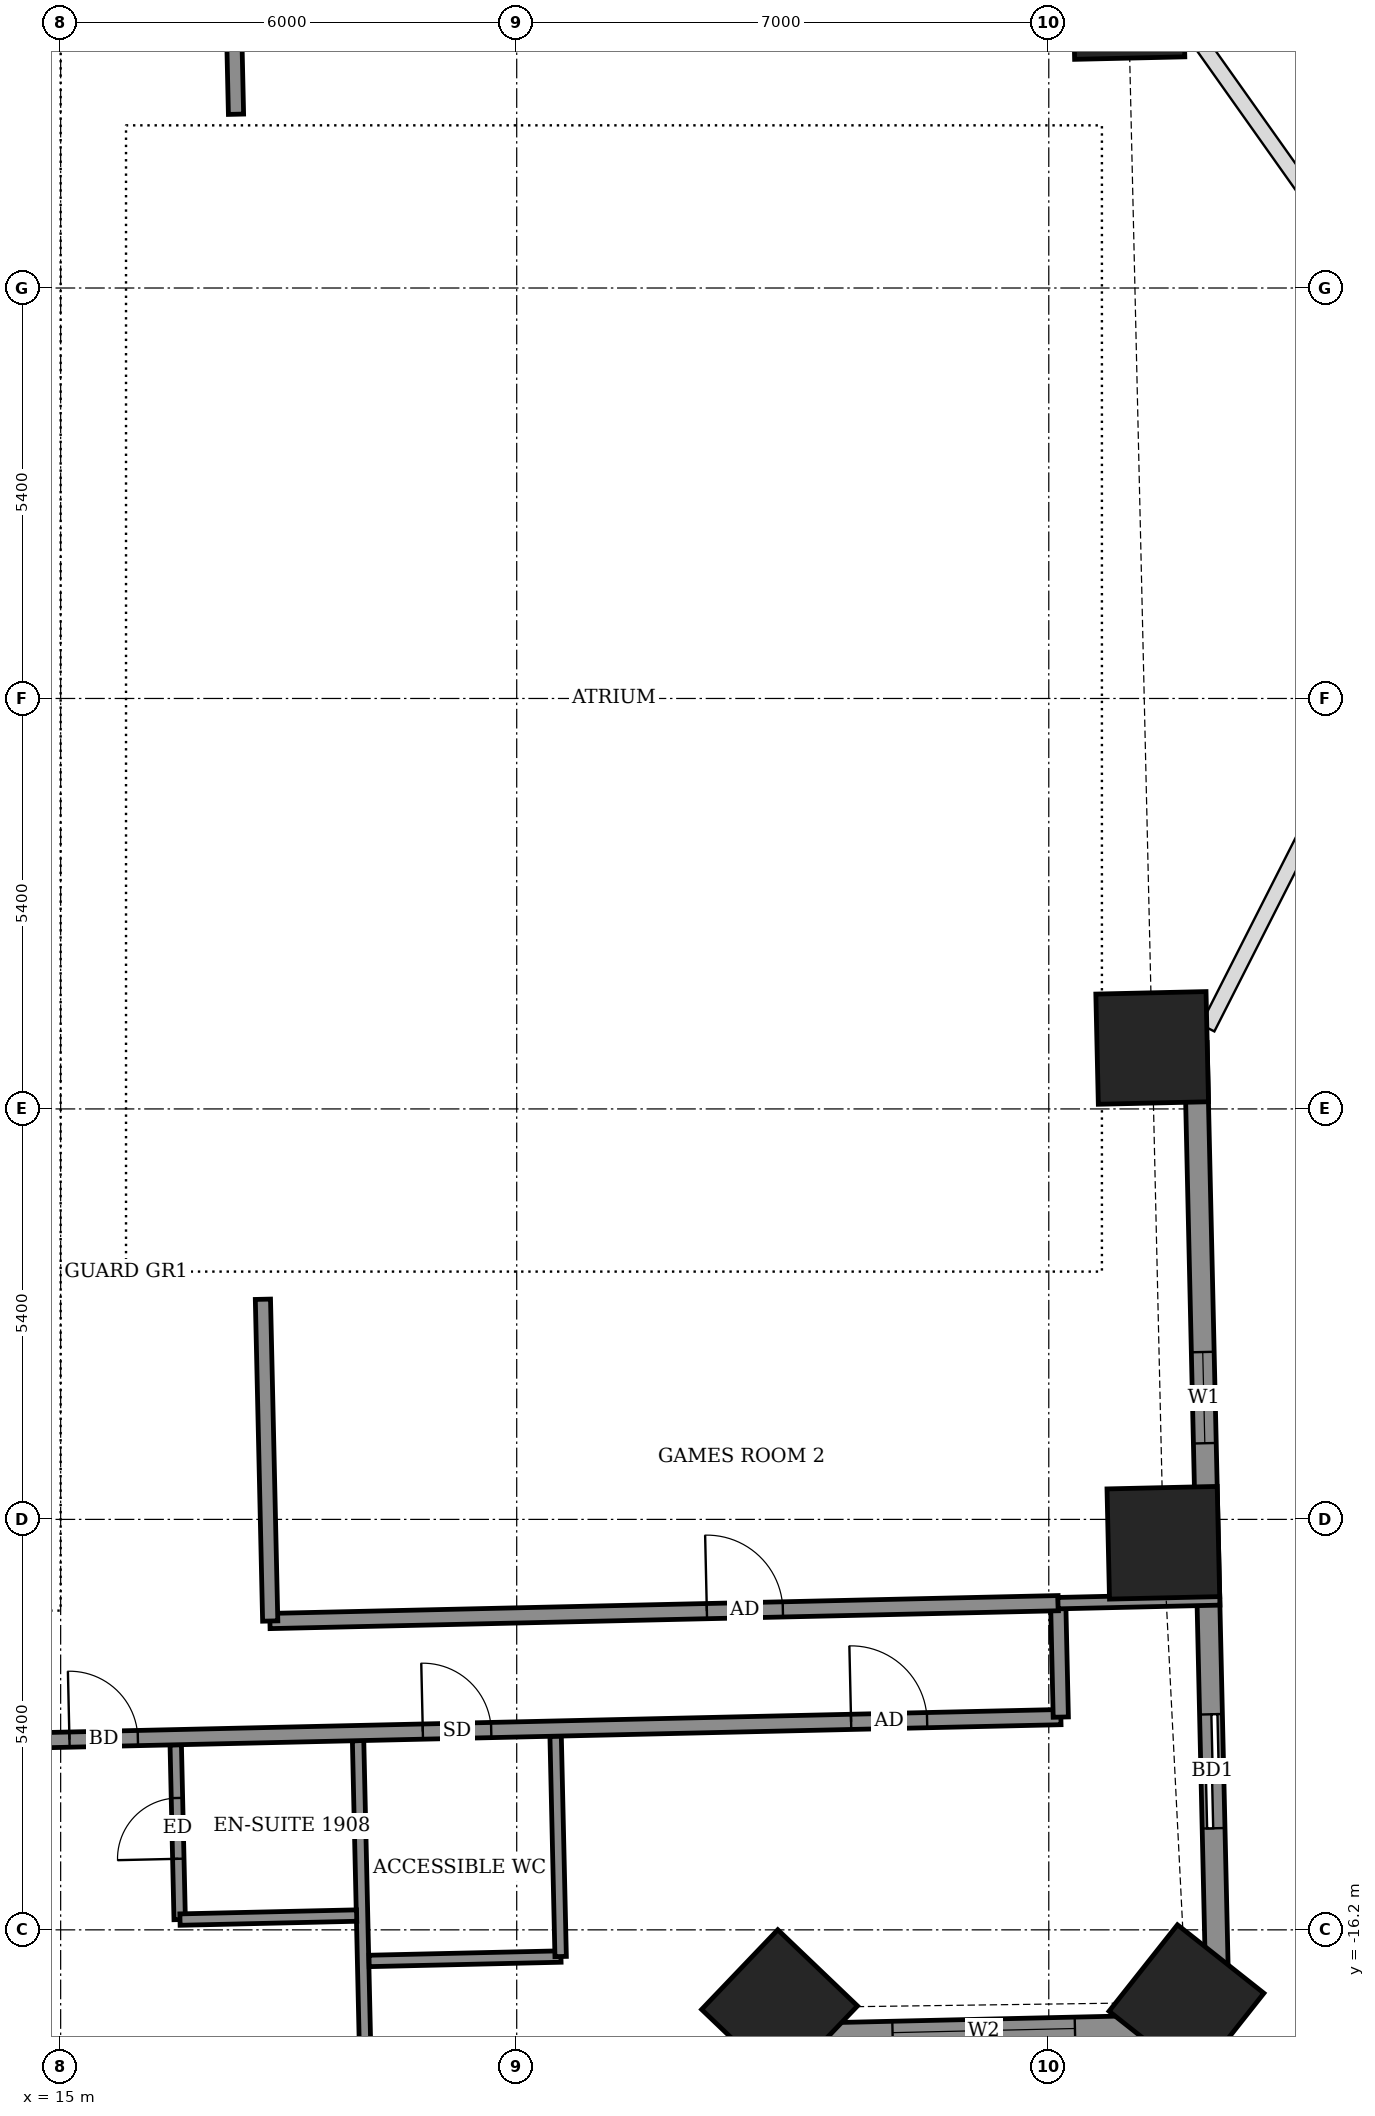
"""IFC4 building model, lengths in metres.
Left out: names, types, materials, properties, quantities, classifications, styles, units other than length and angle.
Written with IfcOpenShell. Run it as: python <this file> out.ifc"""

import sys

from ifc_helpers import new_model, si_unit, direction, frame, frame_2d, origin, origin_2d, place, context, subcontext, project, spatial, rectangle, extrude, element, fill, save


model = new_model("IFC4")
c1 = context("Model", 3, precision=1e-05, world=origin(), true_north=direction((0.0, 1.0)))
c2 = subcontext(c1, "Body", "Model", "MODEL_VIEW")
j1 = project(units=[si_unit("LENGTHUNIT", "METRE"), si_unit("PLANEANGLEUNIT", "RADIAN")], contexts=[c1])
p1 = place(None, origin())
s1 = spatial("IfcSite", under=j1, at=p1, CompositionType="ELEMENT")
p2 = place(p1, origin())
s2 = spatial("IfcBuilding", under=s1, at=p2, CompositionType="ELEMENT")
p3 = place(p2, frame((0.0, 0.0, 79.3)))
s3 = spatial("IfcBuildingStorey", under=s2, at=p3, CompositionType="ELEMENT", Elevation=79.3)
for number, where, z_axis, x_axis in (
    (1, (24.458, -17.224, -0.55), (0.0, 0.0, 1.0), (0.691, 0.723, 0.0)),
    (2, (29.812, -17.152, -0.55), (0.0, 0.0, 1.0), (0.621, 0.784, 0.0)),
    (3, (29.507, -11.107, -0.55), (0.0, 0.0, 1.0), (-0.023, 1.0, 0.0)),
    (4, (29.36, -4.597, -0.55), (0.0, 0.0, 1.0), (-0.023, 1.0, 0.0)),
    (5, (29.048, 9.15, -0.55), (0.0, 0.0, 1.0), (-0.023, 1.0, 0.0)),
):
    element("IfcColumn", number, at=place(p3, frame(where, z_axis=z_axis, x_axis=x_axis)), inside=s3, PredefinedType="COLUMN", context=c2, shape_type="SweptSolid", body=[
        extrude(rectangle(XDim=1.45, YDim=1.45, at=origin_2d()), origin(), (0.0, 0.0, 1.0), 3.6),
    ])
p4 = place(p3, frame((30.227, -17.455, 0.0), z_axis=(0.0, 0.0, 1.0), x_axis=(-0.022734702163, 0.999741533256, 0.0)))
e6 = element("IfcWall", 6, at=p4, inside=s3, PredefinedType="SOLIDWALL", context=c2, shape_type="SweptSolid", body=[
    extrude(rectangle(XDim=12.929, YDim=0.3, at=frame_2d((6.465, 0.0))), origin(), (0.0, 0.0, 1.0), 3.05),
])
p5 = place(p4, frame((2.592, 0.0, 0.0)))
e7 = element("IfcOpeningElement", 7, at=p5, cuts=e6, PredefinedType="OPENING", context=c2, shape_type="SweptSolid", body=[
    extrude(rectangle(XDim=1.5, YDim=2.4, at=frame_2d((0.75, 1.2))), frame((0.0, 0.16, 0.0), z_axis=(0.0, -1.0, 0.0), x_axis=(1.0, 0.0, 0.0)), (0.0, 0.0, 1.0), 0.32),
])
p6 = place(p4, frame((7.659, 0.0, 0.9)))
e8 = element("IfcOpeningElement", 8, at=p6, cuts=e6, PredefinedType="OPENING", context=c2, shape_type="SweptSolid", body=[
    extrude(rectangle(XDim=1.2, YDim=1.5, at=frame_2d((0.6, 0.75))), frame((0.0, 0.16, 0.0), z_axis=(0.0, -1.0, 0.0), x_axis=(1.0, 0.0, 0.0)), (0.0, 0.0, 1.0), 0.32),
])
p7 = place(p3, frame((24.951, -22.977, 0.0), z_axis=(0.0, 0.0, 1.0), x_axis=(-0.022784045517, 0.999740409941, 0.0)))
e9 = element("IfcWall", 9, at=p7, inside=s3, PredefinedType="SOLIDWALL", context=c2, shape_type="SweptSolid", body=[
    extrude(rectangle(XDim=5.401, YDim=0.3, at=frame_2d((2.7, 0.0))), origin(), (0.0, 0.0, 1.0), 2.55),
])
p8 = place(p7, frame((1.885, 0.0, 0.9)))
e10 = element("IfcOpeningElement", 10, at=p8, cuts=e9, PredefinedType="OPENING", context=c2, shape_type="SweptSolid", body=[
    extrude(rectangle(XDim=2.4, YDim=1.5, at=frame_2d((1.2, 0.75))), frame((0.0, 0.16, 0.0), z_axis=(0.0, -1.0, 0.0), x_axis=(1.0, 0.0, 0.0)), (0.0, 0.0, 1.0), 0.32),
])
p9 = place(p3, frame((24.828, -17.578, 0.0), z_axis=(0.0, 0.0, 1.0), x_axis=(0.99974143864, 0.022738862475, 0.0)))
e11 = element("IfcWall", 11, at=p9, inside=s3, PredefinedType="SOLIDWALL", context=c2, shape_type="SweptSolid", body=[
    extrude(rectangle(XDim=5.401, YDim=0.3, at=frame_2d((2.7, 0.0))), origin(), (0.0, 0.0, 1.0), 2.55),
])
p10 = place(p9, frame((1.117, 0.0, 0.9)))
e12 = element("IfcOpeningElement", 12, at=p10, cuts=e11, PredefinedType="OPENING", context=c2, shape_type="SweptSolid", body=[
    extrude(rectangle(XDim=2.4, YDim=1.5, at=frame_2d((1.2, 0.75))), frame((0.0, 0.16, 0.0), z_axis=(0.0, -1.0, 0.0), x_axis=(1.0, 0.0, 0.0)), (0.0, 0.0, 1.0), 0.32),
])
p11 = place(p3, frame((19.123, -22.959, 0.0), z_axis=(0.0, 0.0, 1.0), x_axis=(-0.022697424684, 0.999742380272, 0.0)))
e13 = element("IfcWall", 13, at=p11, inside=s3, PredefinedType="PARTITIONING", context=c2, shape_type="SweptSolid", body=[
    extrude(rectangle(XDim=9.25, YDim=0.15, at=frame_2d((4.625, 0.0))), origin(), (0.0, 0.0, 1.0), 2.55),
])
p12 = place(p3, frame((19.058, -16.609, 0.0), z_axis=(0.0, 0.0, 1.0), x_axis=(0.999737322729, 0.022919108675, 0.0)))
e14 = element("IfcWall", 14, at=p12, inside=s3, PredefinedType="PARTITIONING", context=c2, shape_type="SweptSolid", body=[
    extrude(rectangle(XDim=2.525, YDim=0.15, at=frame_2d((1.262, 0.0))), origin(), (0.0, 0.0, 1.0), 3.05),
])
p13 = place(p3, frame((21.578, -16.551, 0.0), z_axis=(0.0, 0.0, 1.0), x_axis=(-0.022732880677, 0.999741574676, 0.0)))
e15 = element("IfcWall", 15, at=p13, inside=s3, PredefinedType="PARTITIONING", context=c2, shape_type="SweptSolid", body=[
    extrude(rectangle(XDim=2.9, YDim=0.15, at=frame_2d((1.45, 0.0))), origin(), (0.0, 0.0, 1.0), 3.05),
])
p14 = place(p3, frame((16.566, -16.065, 0.0), z_axis=(0.0, 0.0, 1.0), x_axis=(-0.022615284993, 0.999744241736, 0.0)))
e16 = element("IfcWall", 16, at=p14, inside=s3, PredefinedType="PARTITIONING", context=c2, shape_type="SweptSolid", body=[
    extrude(rectangle(XDim=2.299, YDim=0.15, at=frame_2d((1.15, 0.0))), origin(), (0.0, 0.0, 1.0), 3.05),
])
p15 = place(p14, frame((0.8, 0.0, 0.0)))
e17 = element("IfcOpeningElement", 17, at=p15, cuts=e16, PredefinedType="OPENING", context=c2, shape_type="SweptSolid", body=[
    extrude(rectangle(XDim=0.8, YDim=2.1, at=frame_2d((0.4, 1.05))), frame((0.0, 0.085, 0.0), z_axis=(0.0, -1.0, 0.0), x_axis=(1.0, 0.0, 0.0)), (0.0, 0.0, 1.0), 0.17),
])
p16 = place(p3, frame((16.57, -16.065, 0.0), z_axis=(0.0, 0.0, 1.0), x_axis=(0.999740260747, 0.02279059109, 0.0)))
e18 = element("IfcWall", 18, at=p16, inside=s3, PredefinedType="PARTITIONING", context=c2, shape_type="SweptSolid", body=[
    extrude(rectangle(XDim=2.324, YDim=0.15, at=frame_2d((1.162, 0.0))), origin(), (0.0, 0.0, 1.0), 3.05),
])
p17 = place(p3, frame((-24.249, -14.591, 0.0), z_axis=(0.0, 0.0, 1.0), x_axis=(0.999742227308, 0.022704161211, 0.0)))
e19 = element("IfcWall", 19, at=p17, inside=s3, PredefinedType="PARTITIONING", context=c2, shape_type="SweptSolid", body=[
    extrude(rectangle(XDim=52.421, YDim=0.2, at=frame_2d((26.211, 0.0))), origin(), (0.0, 0.0, 1.0), 3.05),
])
p18 = place(p17, frame((0.575, 0.0, 0.0)))
e20 = element("IfcOpeningElement", 20, at=p18, cuts=e19, PredefinedType="OPENING", context=c2, shape_type="SweptSolid", body=[
    extrude(rectangle(XDim=1.0, YDim=2.1, at=frame_2d((0.5, 1.05))), frame((0.0, 0.11, 0.0), z_axis=(0.0, -1.0, 0.0), x_axis=(1.0, 0.0, 0.0)), (0.0, 0.0, 1.0), 0.22),
])
p19 = place(p17, frame((5.225, 0.0, 0.0)))
e21 = element("IfcOpeningElement", 21, at=p19, cuts=e19, PredefinedType="OPENING", context=c2, shape_type="SweptSolid", body=[
    extrude(rectangle(XDim=0.9, YDim=2.1, at=frame_2d((0.45, 1.05))), frame((0.0, 0.11, 0.0), z_axis=(0.0, -1.0, 0.0), x_axis=(1.0, 0.0, 0.0)), (0.0, 0.0, 1.0), 0.22),
])
p20 = place(p17, frame((10.075, 0.0, 0.0)))
e22 = element("IfcOpeningElement", 22, at=p20, cuts=e19, PredefinedType="OPENING", context=c2, shape_type="SweptSolid", body=[
    extrude(rectangle(XDim=0.9, YDim=2.1, at=frame_2d((0.45, 1.05))), frame((0.0, 0.11, 0.0), z_axis=(0.0, -1.0, 0.0), x_axis=(1.0, 0.0, 0.0)), (0.0, 0.0, 1.0), 0.22),
])
p21 = place(p17, frame((12.1, 0.0, 0.0)))
e23 = element("IfcOpeningElement", 23, at=p21, cuts=e19, PredefinedType="OPENING", context=c2, shape_type="SweptSolid", body=[
    extrude(rectangle(XDim=0.9, YDim=2.1, at=frame_2d((0.45, 1.05))), frame((0.0, 0.11, 0.0), z_axis=(0.0, -1.0, 0.0), x_axis=(1.0, 0.0, 0.0)), (0.0, 0.0, 1.0), 0.22),
])
p22 = place(p17, frame((19.025, 0.0, 0.0)))
e24 = element("IfcOpeningElement", 24, at=p22, cuts=e19, PredefinedType="OPENING", context=c2, shape_type="SweptSolid", body=[
    extrude(rectangle(XDim=0.9, YDim=2.1, at=frame_2d((0.45, 1.05))), frame((0.0, 0.11, 0.0), z_axis=(0.0, -1.0, 0.0), x_axis=(1.0, 0.0, 0.0)), (0.0, 0.0, 1.0), 0.22),
])
p23 = place(p17, frame((21.225, 0.0, 0.0)))
e25 = element("IfcOpeningElement", 25, at=p23, cuts=e19, PredefinedType="OPENING", context=c2, shape_type="SweptSolid", body=[
    extrude(rectangle(XDim=0.9, YDim=2.1, at=frame_2d((0.45, 1.05))), frame((0.0, 0.11, 0.0), z_axis=(0.0, -1.0, 0.0), x_axis=(1.0, 0.0, 0.0)), (0.0, 0.0, 1.0), 0.22),
])
p24 = place(p17, frame((28.175, 0.0, 0.0)))
e26 = element("IfcOpeningElement", 26, at=p24, cuts=e19, PredefinedType="OPENING", context=c2, shape_type="SweptSolid", body=[
    extrude(rectangle(XDim=0.9, YDim=2.1, at=frame_2d((0.45, 1.05))), frame((0.0, 0.11, 0.0), z_axis=(0.0, -1.0, 0.0), x_axis=(1.0, 0.0, 0.0)), (0.0, 0.0, 1.0), 0.22),
])
p25 = place(p17, frame((30.425, 0.0, 0.0)))
e27 = element("IfcOpeningElement", 27, at=p25, cuts=e19, PredefinedType="OPENING", context=c2, shape_type="SweptSolid", body=[
    extrude(rectangle(XDim=0.9, YDim=2.1, at=frame_2d((0.45, 1.05))), frame((0.0, 0.11, 0.0), z_axis=(0.0, -1.0, 0.0), x_axis=(1.0, 0.0, 0.0)), (0.0, 0.0, 1.0), 0.22),
])
p26 = place(p17, frame((37.4, 0.0, 0.0)))
e28 = element("IfcOpeningElement", 28, at=p26, cuts=e19, PredefinedType="OPENING", context=c2, shape_type="SweptSolid", body=[
    extrude(rectangle(XDim=0.9, YDim=2.1, at=frame_2d((0.45, 1.05))), frame((0.0, 0.11, 0.0), z_axis=(0.0, -1.0, 0.0), x_axis=(1.0, 0.0, 0.0)), (0.0, 0.0, 1.0), 0.22),
])
p27 = place(p17, frame((39.375, 0.0, 0.0)))
e29 = element("IfcOpeningElement", 29, at=p27, cuts=e19, PredefinedType="OPENING", context=c2, shape_type="SweptSolid", body=[
    extrude(rectangle(XDim=0.9, YDim=2.1, at=frame_2d((0.45, 1.05))), frame((0.0, 0.11, 0.0), z_axis=(0.0, -1.0, 0.0), x_axis=(1.0, 0.0, 0.0)), (0.0, 0.0, 1.0), 0.22),
])
p28 = place(p17, frame((49.661, 0.0, 0.0)))
e30 = element("IfcOpeningElement", 30, at=p28, cuts=e19, PredefinedType="OPENING", context=c2, shape_type="SweptSolid", body=[
    extrude(rectangle(XDim=1.0, YDim=2.1, at=frame_2d((0.5, 1.05))), frame((0.0, 0.11, 0.0), z_axis=(0.0, -1.0, 0.0), x_axis=(1.0, 0.0, 0.0)), (0.0, 0.0, 1.0), 0.22),
])
p29 = place(p17, frame((44.025, 0.0, 0.0)))
e31 = element("IfcOpeningElement", 31, at=p29, cuts=e19, PredefinedType="OPENING", context=c2, shape_type="SweptSolid", body=[
    extrude(rectangle(XDim=0.9, YDim=2.1, at=frame_2d((0.45, 1.05))), frame((0.0, 0.11, 0.0), z_axis=(0.0, -1.0, 0.0), x_axis=(1.0, 0.0, 0.0)), (0.0, 0.0, 1.0), 0.22),
])
p30 = place(p3, frame((28.158, -13.401, 0.0), z_axis=(0.0, 0.0, 1.0), x_axis=(-0.022636322434, 0.999743765625, 0.0)))
e32 = element("IfcWall", 32, at=p30, inside=s3, PredefinedType="PARTITIONING", context=c2, shape_type="SweptSolid", body=[
    extrude(rectangle(XDim=1.499, YDim=0.2, at=frame_2d((0.75, 0.0))), origin(), (0.0, 0.0, 1.0), 3.05),
])
p31 = place(p3, frame((17.753, -12.137, 0.0), z_axis=(0.0, 0.0, 1.0), x_axis=(0.999743727281, 0.022638015856, 0.0)))
e33 = element("IfcWall", 33, at=p31, inside=s3, PredefinedType="PARTITIONING", context=c2, shape_type="SweptSolid", body=[
    extrude(rectangle(XDim=10.375, YDim=0.2, at=frame_2d((5.188, 0.0))), origin(), (0.0, 0.0, 1.0), 3.05),
])
p32 = place(p31, frame((5.75, 0.0, 0.0)))
e34 = element("IfcOpeningElement", 34, at=p32, cuts=e33, PredefinedType="OPENING", context=c2, shape_type="SweptSolid", body=[
    extrude(rectangle(XDim=1.0, YDim=2.1, at=frame_2d((0.5, 1.05))), frame((0.0, 0.11, 0.0), z_axis=(0.0, -1.0, 0.0), x_axis=(1.0, 0.0, 0.0)), (0.0, 0.0, 1.0), 0.22),
])
p33 = place(p3, frame((17.757, -12.137, 0.0), z_axis=(0.0, 0.0, 1.0), x_axis=(-0.022718785711, 0.999741895079, 0.0)))
e35 = element("IfcWall", 35, at=p33, inside=s3, PredefinedType="PARTITIONING", context=c2, shape_type="SweptSolid", body=[
    extrude(rectangle(XDim=4.234, YDim=0.2, at=frame_2d((2.117, 0.0))), origin(), (0.0, 0.0, 1.0), 3.05),
])
p34 = place(p3, frame((28.121, -11.902, 0.0), z_axis=(0.0, 0.0, 1.0), x_axis=(0.999734443994, 0.023044337528, 0.0)))
e36 = element("IfcWall", 36, at=p34, inside=s3, PredefinedType="PARTITIONING", context=c2, shape_type="SweptSolid", body=[
    extrude(rectangle(XDim=2.129, YDim=0.15, at=frame_2d((1.065, 0.0))), origin(), (0.0, 0.0, 1.0), 2.55),
])
p35 = place(p3, frame((17.307, 7.686, 0.0), z_axis=(0.0, 0.0, 1.0), x_axis=(-0.022584272568, 0.999744942789, 0.0)))
e37 = element("IfcWall", 37, at=p35, inside=s3, PredefinedType="PARTITIONING", context=c2, shape_type="SweptSolid", body=[
    extrude(rectangle(XDim=5.621, YDim=0.2, at=frame_2d((2.811, 0.0))), origin(), (0.0, 0.0, 1.0), 3.05),
])
p36 = place(p3, frame((14.35, -10.8, 0.0), z_axis=(0.0, 0.0, 1.0), x_axis=(0.0, 1.0, 0.0)))
e38 = element("IfcWall", 38, at=p36, inside=s3, PredefinedType="SHEAR", context=c2, shape_type="SweptSolid", body=[
    extrude(rectangle(XDim=21.6, YDim=1.1, at=frame_2d((10.8, 0.0))), origin(), (0.0, 0.0, 1.0), 3.6),
])
p37 = place(p36, frame((1.2, 0.0, 0.0)))
e39 = element("IfcOpeningElement", 39, at=p37, cuts=e38, PredefinedType="OPENING", context=c2, shape_type="SweptSolid", body=[
    extrude(rectangle(XDim=1.2, YDim=2.1, at=frame_2d((0.6, 1.05))), frame((0.0, 0.56, 0.0), z_axis=(0.0, -1.0, 0.0), x_axis=(1.0, 0.0, 0.0)), (0.0, 0.0, 1.0), 1.12),
])
p38 = place(p5, origin())
e40 = element("IfcDoor", 40, at=p38, inside=s3, OperationType="SLIDING_TO_LEFT", PredefinedType="DOOR", context=c2, shape_type="SweptSolid", body=[
    extrude(rectangle(XDim=1.5, YDim=2.4, at=frame_2d((0.75, 1.2))), frame((0.0, 0.025, 0.0), z_axis=(0.0, -1.0, 0.0), x_axis=(1.0, 0.0, 0.0)), (0.0, 0.0, 1.0), 0.05),
])
fill(e7, e40)
p39 = place(p6, origin())
e41 = element("IfcWindow", 41, at=p39, inside=s3, PartitioningType="SINGLE_PANEL", PredefinedType="WINDOW", context=c2, shape_type="SweptSolid", body=[
    extrude(rectangle(XDim=1.2, YDim=1.5, at=frame_2d((0.6, 0.75))), frame((0.0, 0.03, 0.0), z_axis=(0.0, -1.0, 0.0), x_axis=(1.0, 0.0, 0.0)), (0.0, 0.0, 1.0), 0.06),
])
fill(e8, e41)
p40 = place(p10, origin())
e42 = element("IfcWindow", 42, at=p40, inside=s3, PartitioningType="DOUBLE_PANEL_VERTICAL", PredefinedType="WINDOW", context=c2, shape_type="SweptSolid", body=[
    extrude(rectangle(XDim=2.4, YDim=1.5, at=frame_2d((1.2, 0.75))), frame((0.0, 0.03, 0.0), z_axis=(0.0, -1.0, 0.0), x_axis=(1.0, 0.0, 0.0)), (0.0, 0.0, 1.0), 0.06),
])
fill(e12, e42)
p41 = place(p27, origin())
e43 = element("IfcDoor", 43, at=p41, inside=s3, OperationType="SINGLE_SWING_RIGHT", PredefinedType="DOOR", context=c2, shape_type="SweptSolid", body=[
    extrude(rectangle(XDim=0.9, YDim=2.1, at=frame_2d((0.45, 1.05))), frame((0.0, 0.025, 0.0), z_axis=(0.0, -1.0, 0.0), x_axis=(1.0, 0.0, 0.0)), (0.0, 0.0, 1.0), 0.05),
])
fill(e29, e43)
p42 = place(p15, origin())
e44 = element("IfcDoor", 44, at=p42, inside=s3, OperationType="SINGLE_SWING_RIGHT", PredefinedType="DOOR", context=c2, shape_type="SweptSolid", body=[
    extrude(rectangle(XDim=0.8, YDim=2.1, at=frame_2d((0.4, 1.05))), frame((0.0, 0.025, 0.0), z_axis=(0.0, -1.0, 0.0), x_axis=(1.0, 0.0, 0.0)), (0.0, 0.0, 1.0), 0.05),
])
fill(e17, e44)
p43 = place(p28, origin())
e45 = element("IfcDoor", 45, at=p43, inside=s3, OperationType="SINGLE_SWING_RIGHT", PredefinedType="DOOR", context=c2, shape_type="SweptSolid", body=[
    extrude(rectangle(XDim=1.0, YDim=2.1, at=frame_2d((0.5, 1.05))), frame((0.0, 0.025, 0.0), z_axis=(0.0, -1.0, 0.0), x_axis=(1.0, 0.0, 0.0)), (0.0, 0.0, 1.0), 0.05),
])
fill(e30, e45)
p44 = place(p29, origin())
e46 = element("IfcDoor", 46, at=p44, inside=s3, OperationType="SINGLE_SWING_RIGHT", PredefinedType="DOOR", context=c2, shape_type="SweptSolid", body=[
    extrude(rectangle(XDim=0.9, YDim=2.1, at=frame_2d((0.45, 1.05))), frame((0.0, 0.025, 0.0), z_axis=(0.0, -1.0, 0.0), x_axis=(1.0, 0.0, 0.0)), (0.0, 0.0, 1.0), 0.05),
])
fill(e31, e46)
p45 = place(p32, origin())
e47 = element("IfcDoor", 47, at=p45, inside=s3, OperationType="SINGLE_SWING_LEFT", PredefinedType="DOOR", context=c2, shape_type="SweptSolid", body=[
    extrude(rectangle(XDim=1.0, YDim=2.1, at=frame_2d((0.5, 1.05))), frame((0.0, 0.025, 0.0), z_axis=(0.0, -1.0, 0.0), x_axis=(1.0, 0.0, 0.0)), (0.0, 0.0, 1.0), 0.05),
])
fill(e34, e47)
save(model, sys.argv[1])
